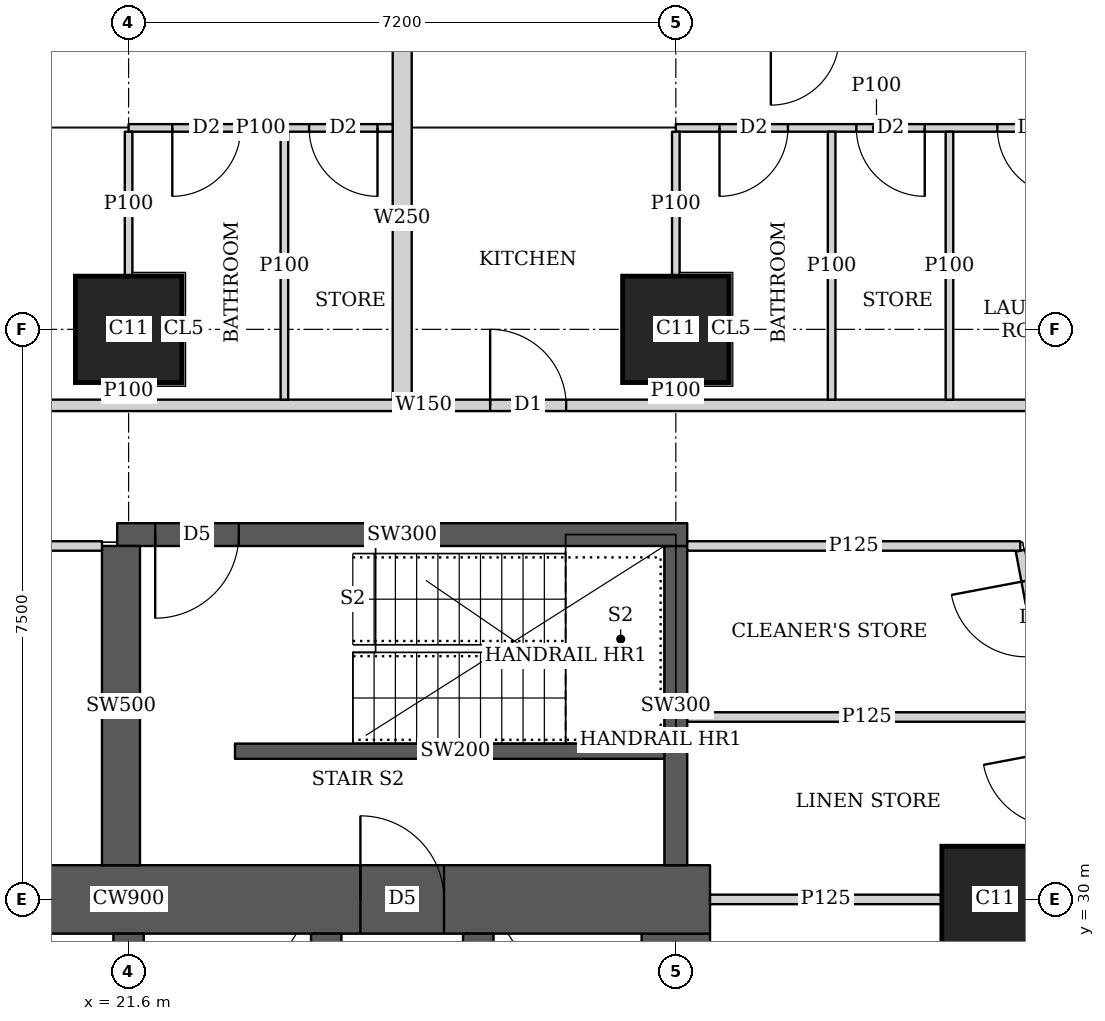
"""IFC4 building model, lengths in metres.
Left out: names, types, materials, properties, quantities, classifications, styles, units other than length and angle.
Written with IfcOpenShell. Run it as: python <this file> out.ifc"""

import sys

from ifc_helpers import new_model, si_unit, direction, frame, frame_2d, origin, origin_2d, place, context, subcontext, project, spatial, rectangle, extrude, element, fill, save


model = new_model("IFC4")
c1 = context("Model", 3, precision=1e-05, world=origin(), true_north=direction((0.0, 1.0)))
c2 = subcontext(c1, "Body", "Model", "MODEL_VIEW")
j1 = project(units=[si_unit("LENGTHUNIT", "METRE"), si_unit("PLANEANGLEUNIT", "RADIAN")], contexts=[c1])
p1 = place(None, origin())
s1 = spatial("IfcSite", under=j1, at=p1, CompositionType="ELEMENT")
p2 = place(p1, origin())
s2 = spatial("IfcBuilding", under=s1, at=p2, CompositionType="ELEMENT")
p3 = place(p2, frame((0.0, 0.0, 223.7)))
s3 = spatial("IfcBuildingStorey", under=s2, at=p3, CompositionType="ELEMENT", Elevation=223.7)
for number, where, z_axis, x_axis in (
    (1, (33.0, 30.0, 0.0), (0.0, 0.0, 1.0), (1.0, 0.0, 0.0)),
    (2, (21.6, 37.5, 0.0), (0.0, 0.0, 1.0), (1.0, 0.0, 0.0)),
    (3, (28.8, 37.5, 0.0), (0.0, 0.0, 1.0), (1.0, 0.0, 0.0)),
):
    element("IfcColumn", number, at=place(p3, frame(where, z_axis=z_axis, x_axis=x_axis)), inside=s3, PredefinedType="COLUMN", context=c2, shape_type="SweptSolid", body=[
        extrude(rectangle(XDim=1.4, YDim=1.4, at=origin_2d()), origin(), (0.0, 0.0, 1.0), 3.75),
    ])
p4 = place(p3, frame((13.95, 30.0, 0.0), z_axis=(0.0, 0.0, 1.0), x_axis=(1.0, 0.0, 0.0)))
e4 = element("IfcWall", 4, at=p4, inside=s3, PredefinedType="SHEAR", context=c2, shape_type="SweptSolid", body=[
    extrude(rectangle(XDim=15.3, YDim=0.9, at=frame_2d((7.65, 0.0))), origin(), (0.0, 0.0, 1.0), 3.75),
])
p5 = place(p4, frame((4.45, 0.0, 0.0)))
e5 = element("IfcOpeningElement", 5, at=p5, cuts=e4, PredefinedType="OPENING", context=c2, shape_type="SweptSolid", body=[
    extrude(rectangle(XDim=1.8, YDim=2.1, at=frame_2d((0.9, 1.05))), frame((0.0, 0.46, 0.0), z_axis=(0.0, -1.0, 0.0), x_axis=(1.0, 0.0, 0.0)), (0.0, 0.0, 1.0), 0.92),
])
p6 = place(p4, frame((10.7, 0.0, 0.0)))
e6 = element("IfcOpeningElement", 6, at=p6, cuts=e4, PredefinedType="OPENING", context=c2, shape_type="SweptSolid", body=[
    extrude(rectangle(XDim=1.1, YDim=2.1, at=frame_2d((0.55, 1.05))), frame((0.0, 0.46, 0.0), z_axis=(0.0, -1.0, 0.0), x_axis=(1.0, 0.0, 0.0)), (0.0, 0.0, 1.0), 0.92),
])
p7 = place(p3, frame((28.8, 15.45, 0.0), z_axis=(0.0, 0.0, 1.0), x_axis=(0.0, 1.0, 0.0)))
e7 = element("IfcWall", 7, at=p7, inside=s3, PredefinedType="SHEAR", context=c2, shape_type="SweptSolid", body=[
    extrude(rectangle(XDim=14.1, YDim=0.9, at=frame_2d((7.05, 0.0))), origin(), (0.0, 0.0, 1.0), 3.75),
])
p8 = place(p3, frame((21.6, 15.45, 0.0), z_axis=(0.0, 0.0, 1.0), x_axis=(0.0, 1.0, 0.0)))
e8 = element("IfcWall", 8, at=p8, inside=s3, PredefinedType="SHEAR", context=c2, shape_type="SweptSolid", body=[
    extrude(rectangle(XDim=14.1, YDim=0.4, at=frame_2d((7.05, 0.0))), origin(), (0.0, 0.0, 1.0), 3.75),
])
p9 = place(p8, frame((0.875, 0.0, 0.0)))
e9 = element("IfcOpeningElement", 9, at=p9, cuts=e8, PredefinedType="OPENING", context=c2, shape_type="SweptSolid", body=[
    extrude(rectangle(XDim=1.1, YDim=2.1, at=frame_2d((0.55, 1.05))), frame((0.0, 0.21, 0.0), z_axis=(0.0, -1.0, 0.0), x_axis=(1.0, 0.0, 0.0)), (0.0, 0.0, 1.0), 0.42),
])
p10 = place(p8, frame((4.625, 0.0, 0.0)))
e10 = element("IfcOpeningElement", 10, at=p10, cuts=e8, PredefinedType="OPENING", context=c2, shape_type="SweptSolid", body=[
    extrude(rectangle(XDim=1.1, YDim=2.1, at=frame_2d((0.55, 1.05))), frame((0.0, 0.21, 0.0), z_axis=(0.0, -1.0, 0.0), x_axis=(1.0, 0.0, 0.0)), (0.0, 0.0, 1.0), 0.42),
])
p11 = place(p8, frame((8.375, 0.0, 0.0)))
e11 = element("IfcOpeningElement", 11, at=p11, cuts=e8, PredefinedType="OPENING", context=c2, shape_type="SweptSolid", body=[
    extrude(rectangle(XDim=1.1, YDim=2.1, at=frame_2d((0.55, 1.05))), frame((0.0, 0.21, 0.0), z_axis=(0.0, -1.0, 0.0), x_axis=(1.0, 0.0, 0.0)), (0.0, 0.0, 1.0), 0.42),
])
p12 = place(p8, frame((12.125, 0.0, 0.0)))
e12 = element("IfcOpeningElement", 12, at=p12, cuts=e8, PredefinedType="OPENING", context=c2, shape_type="SweptSolid", body=[
    extrude(rectangle(XDim=1.1, YDim=2.1, at=frame_2d((0.55, 1.05))), frame((0.0, 0.21, 0.0), z_axis=(0.0, -1.0, 0.0), x_axis=(1.0, 0.0, 0.0)), (0.0, 0.0, 1.0), 0.42),
])
p13 = place(p3, frame((24.2, 15.45, 0.0), z_axis=(0.0, 0.0, 1.0), x_axis=(0.0, 1.0, 0.0)))
e13 = element("IfcWall", 13, at=p13, inside=s3, PredefinedType="SHEAR", context=c2, shape_type="SweptSolid", body=[
    extrude(rectangle(XDim=14.1, YDim=0.4, at=frame_2d((7.05, 0.0))), origin(), (0.0, 0.0, 1.0), 3.75),
])
p14 = place(p3, frame((26.2, 26.45, 0.0), z_axis=(0.0, 0.0, 1.0), x_axis=(0.0, 1.0, 0.0)))
e14 = element("IfcWall", 14, at=p14, inside=s3, PredefinedType="SHEAR", context=c2, shape_type="SweptSolid", body=[
    extrude(rectangle(XDim=3.1, YDim=0.4, at=frame_2d((1.55, 0.0))), origin(), (0.0, 0.0, 1.0), 3.75),
])
p15 = place(p14, frame((1.075, 0.0, 0.0)))
e15 = element("IfcOpeningElement", 15, at=p15, cuts=e14, PredefinedType="OPENING", context=c2, shape_type="SweptSolid", body=[
    extrude(rectangle(XDim=1.2, YDim=2.1, at=frame_2d((0.6, 1.05))), frame((0.0, 0.21, 0.0), z_axis=(0.0, -1.0, 0.0), x_axis=(1.0, 0.0, 0.0)), (0.0, 0.0, 1.0), 0.42),
])
p16 = place(p3, frame((21.45, 34.8, 0.0), z_axis=(0.0, 0.0, 1.0), x_axis=(1.0, 0.0, 0.0)))
e16 = element("IfcWall", 16, at=p16, inside=s3, PredefinedType="SHEAR", context=c2, shape_type="SweptSolid", body=[
    extrude(rectangle(XDim=7.5, YDim=0.3, at=frame_2d((3.75, 0.0))), origin(), (0.0, 0.0, 1.0), 3.75),
])
p17 = place(p16, frame((0.5, 0.0, 0.0)))
e17 = element("IfcOpeningElement", 17, at=p17, cuts=e16, PredefinedType="OPENING", context=c2, shape_type="SweptSolid", body=[
    extrude(rectangle(XDim=1.1, YDim=2.1, at=frame_2d((0.55, 1.05))), frame((0.0, 0.16, 0.0), z_axis=(0.0, -1.0, 0.0), x_axis=(1.0, 0.0, 0.0)), (0.0, 0.0, 1.0), 0.32),
])
p18 = place(p3, frame((21.5, 30.45, 0.0), z_axis=(0.0, 0.0, 1.0), x_axis=(0.0, 1.0, 0.0)))
e18 = element("IfcWall", 18, at=p18, inside=s3, PredefinedType="SHEAR", context=c2, shape_type="SweptSolid", body=[
    extrude(rectangle(XDim=4.2, YDim=0.5, at=frame_2d((2.1, 0.0))), origin(), (0.0, 0.0, 1.0), 3.75),
])
p19 = place(p3, frame((28.8, 30.45, 0.0), z_axis=(0.0, 0.0, 1.0), x_axis=(0.0, 1.0, 0.0)))
e19 = element("IfcWall", 19, at=p19, inside=s3, PredefinedType="SHEAR", context=c2, shape_type="SweptSolid", body=[
    extrude(rectangle(XDim=4.2, YDim=0.3, at=frame_2d((2.1, 0.0))), origin(), (0.0, 0.0, 1.0), 3.75),
])
p20 = place(p3, frame((16.201, 36.5, 0.0), z_axis=(0.0, 0.0, 1.0), x_axis=(1.0, 0.0, 0.0)))
e20 = element("IfcWall", 20, at=p20, inside=s3, PredefinedType="SOLIDWALL", context=c2, shape_type="SweptSolid", body=[
    extrude(rectangle(XDim=18.564, YDim=0.15, at=frame_2d((9.282, 0.0))), origin(), (0.0, 0.0, 1.0), 3.5),
])
p21 = place(p20, frame((0.874, 0.0, 0.0)))
e21 = element("IfcOpeningElement", 21, at=p21, cuts=e20, PredefinedType="OPENING", context=c2, shape_type="SweptSolid", body=[
    extrude(rectangle(XDim=1.0, YDim=2.1, at=frame_2d((0.5, 1.05))), frame((0.0, 0.085, 0.0), z_axis=(0.0, -1.0, 0.0), x_axis=(1.0, 0.0, 0.0)), (0.0, 0.0, 1.0), 0.17),
])
p22 = place(p20, frame((10.156, 0.0, 0.0)))
e22 = element("IfcOpeningElement", 22, at=p22, cuts=e20, PredefinedType="OPENING", context=c2, shape_type="SweptSolid", body=[
    extrude(rectangle(XDim=1.0, YDim=2.1, at=frame_2d((0.5, 1.05))), frame((0.0, 0.085, 0.0), z_axis=(0.0, -1.0, 0.0), x_axis=(1.0, 0.0, 0.0)), (0.0, 0.0, 1.0), 0.17),
])
p23 = place(p3, frame((21.6, 40.15, 0.0), z_axis=(0.0, 0.0, 1.0), x_axis=(1.0, 0.0, 0.0)))
e23 = element("IfcWall", 23, at=p23, inside=s3, PredefinedType="PARTITIONING", context=c2, shape_type="SweptSolid", body=[
    extrude(rectangle(XDim=3.475, YDim=0.1, at=frame_2d((1.737, 0.0))), origin(), (0.0, 0.0, 1.0), 3.5),
])
p24 = place(p23, frame((0.575, 0.0, 0.0)))
e24 = element("IfcOpeningElement", 24, at=p24, cuts=e23, PredefinedType="OPENING", context=c2, shape_type="SweptSolid", body=[
    extrude(rectangle(XDim=0.9, YDim=2.1, at=frame_2d((0.45, 1.05))), frame((0.0, 0.06, 0.0), z_axis=(0.0, -1.0, 0.0), x_axis=(1.0, 0.0, 0.0)), (0.0, 0.0, 1.0), 0.12),
])
p25 = place(p23, frame((2.375, 0.0, 0.0)))
e25 = element("IfcOpeningElement", 25, at=p25, cuts=e23, PredefinedType="OPENING", context=c2, shape_type="SweptSolid", body=[
    extrude(rectangle(XDim=0.9, YDim=2.1, at=frame_2d((0.45, 1.05))), frame((0.0, 0.06, 0.0), z_axis=(0.0, -1.0, 0.0), x_axis=(1.0, 0.0, 0.0)), (0.0, 0.0, 1.0), 0.12),
])
p26 = place(p3, frame((21.6, 36.575, 0.0), z_axis=(0.0, 0.0, 1.0), x_axis=(0.0, 1.0, 0.0)))
e26 = element("IfcWall", 26, at=p26, inside=s3, PredefinedType="PARTITIONING", context=c2, shape_type="SweptSolid", body=[
    extrude(rectangle(XDim=0.224, YDim=0.1, at=frame_2d((0.112, 0.0))), origin(), (0.0, 0.0, 1.0), 3.5),
])
p27 = place(p3, frame((21.6, 38.201, 0.0), z_axis=(0.0, 0.0, 1.0), x_axis=(0.0, 1.0, 0.0)))
e27 = element("IfcWall", 27, at=p27, inside=s3, PredefinedType="PARTITIONING", context=c2, shape_type="SweptSolid", body=[
    extrude(rectangle(XDim=1.899, YDim=0.1, at=frame_2d((0.95, 0.0))), origin(), (0.0, 0.0, 1.0), 3.5),
])
p28 = place(p3, frame((23.65, 36.575, 0.0), z_axis=(0.0, 0.0, 1.0), x_axis=(0.0, 1.0, 0.0)))
e28 = element("IfcWall", 28, at=p28, inside=s3, PredefinedType="PARTITIONING", context=c2, shape_type="SweptSolid", body=[
    extrude(rectangle(XDim=3.525, YDim=0.1, at=frame_2d((1.763, 0.0))), origin(), (0.0, 0.0, 1.0), 3.5),
])
p29 = place(p3, frame((28.8, 40.15, 0.0), z_axis=(0.0, 0.0, 1.0), x_axis=(1.0, 0.0, 0.0)))
e29 = element("IfcWall", 29, at=p29, inside=s3, PredefinedType="PARTITIONING", context=c2, shape_type="SweptSolid", body=[
    extrude(rectangle(XDim=5.28, YDim=0.1, at=frame_2d((2.64, 0.0))), origin(), (0.0, 0.0, 1.0), 3.5),
])
p30 = place(p29, frame((0.575, 0.0, 0.0)))
e30 = element("IfcOpeningElement", 30, at=p30, cuts=e29, PredefinedType="OPENING", context=c2, shape_type="SweptSolid", body=[
    extrude(rectangle(XDim=0.9, YDim=2.1, at=frame_2d((0.45, 1.05))), frame((0.0, 0.06, 0.0), z_axis=(0.0, -1.0, 0.0), x_axis=(1.0, 0.0, 0.0)), (0.0, 0.0, 1.0), 0.12),
])
p31 = place(p29, frame((4.23, 0.0, 0.0)))
e31 = element("IfcOpeningElement", 31, at=p31, cuts=e29, PredefinedType="OPENING", context=c2, shape_type="SweptSolid", body=[
    extrude(rectangle(XDim=0.9, YDim=2.1, at=frame_2d((0.45, 1.05))), frame((0.0, 0.06, 0.0), z_axis=(0.0, -1.0, 0.0), x_axis=(1.0, 0.0, 0.0)), (0.0, 0.0, 1.0), 0.12),
])
p32 = place(p29, frame((2.375, 0.0, 0.0)))
e32 = element("IfcOpeningElement", 32, at=p32, cuts=e29, PredefinedType="OPENING", context=c2, shape_type="SweptSolid", body=[
    extrude(rectangle(XDim=0.9, YDim=2.1, at=frame_2d((0.45, 1.05))), frame((0.0, 0.06, 0.0), z_axis=(0.0, -1.0, 0.0), x_axis=(1.0, 0.0, 0.0)), (0.0, 0.0, 1.0), 0.12),
])
p33 = place(p3, frame((28.8, 36.575, 0.0), z_axis=(0.0, 0.0, 1.0), x_axis=(0.0, 1.0, 0.0)))
e33 = element("IfcWall", 33, at=p33, inside=s3, PredefinedType="PARTITIONING", context=c2, shape_type="SweptSolid", body=[
    extrude(rectangle(XDim=0.224, YDim=0.1, at=frame_2d((0.112, 0.0))), origin(), (0.0, 0.0, 1.0), 3.5),
])
p34 = place(p3, frame((28.8, 38.201, 0.0), z_axis=(0.0, 0.0, 1.0), x_axis=(0.0, 1.0, 0.0)))
e34 = element("IfcWall", 34, at=p34, inside=s3, PredefinedType="PARTITIONING", context=c2, shape_type="SweptSolid", body=[
    extrude(rectangle(XDim=1.899, YDim=0.1, at=frame_2d((0.95, 0.0))), origin(), (0.0, 0.0, 1.0), 3.5),
])
for number, where, z_axis, x_axis in (
    (35, (32.4, 36.575, 0.0), (0.0, 0.0, 1.0), (0.0, 1.0, 0.0)),
    (36, (30.85, 36.575, 0.0), (0.0, 0.0, 1.0), (0.0, 1.0, 0.0)),
):
    element("IfcWall", number, at=place(p3, frame(where, z_axis=z_axis, x_axis=x_axis)), inside=s3, PredefinedType="PARTITIONING", context=c2, shape_type="SweptSolid", body=[
        extrude(rectangle(XDim=3.525, YDim=0.1, at=frame_2d((1.763, 0.0))), origin(), (0.0, 0.0, 1.0), 3.5),
    ])
p35 = place(p3, frame((25.2, 36.575, 0.0), z_axis=(0.0, 0.0, 1.0), x_axis=(0.0, 1.0, 0.0)))
e37 = element("IfcWall", 37, at=p35, inside=s3, PredefinedType="SOLIDWALL", context=c2, shape_type="SweptSolid", body=[
    extrude(rectangle(XDim=4.775, YDim=0.25, at=frame_2d((2.388, 0.0))), origin(), (0.0, 0.0, 1.0), 3.5),
])
p36 = place(p3, frame((13.75, 34.65, 0.0), z_axis=(0.0, 0.0, 1.0), x_axis=(1.0, 0.0, 0.0)))
e38 = element("IfcWall", 38, at=p36, inside=s3, PredefinedType="PARTITIONING", context=c2, shape_type="SweptSolid", body=[
    extrude(rectangle(XDim=7.5, YDim=0.125, at=frame_2d((3.75, 0.0))), origin(), (0.0, 0.0, 1.0), 3.5),
])
p37 = place(p36, frame((4.15, 0.0, 0.0)))
e39 = element("IfcOpeningElement", 39, at=p37, cuts=e38, PredefinedType="OPENING", context=c2, shape_type="SweptSolid", body=[
    extrude(rectangle(XDim=1.8, YDim=2.1, at=frame_2d((0.9, 1.05))), frame((0.0, 0.073, 0.0), z_axis=(0.0, -1.0, 0.0), x_axis=(1.0, 0.0, 0.0)), (0.0, 0.0, 1.0), 0.145),
])
p38 = place(p3, frame((28.95, 34.65, 0.0), z_axis=(0.0, 0.0, 1.0), x_axis=(1.0, 0.0, 0.0)))
e40 = element("IfcWall", 40, at=p38, inside=s3, PredefinedType="PARTITIONING", context=c2, shape_type="SweptSolid", body=[
    extrude(rectangle(XDim=4.381, YDim=0.125, at=frame_2d((2.19, 0.0))), origin(), (0.0, 0.0, 1.0), 3.5),
])
p39 = place(p3, frame((34.193, 30.04, 0.0), z_axis=(0.0, 0.0, 1.0), x_axis=(-0.185626015863, 0.982620467034, 0.0)))
e41 = element("IfcWall", 41, at=p39, inside=s3, PredefinedType="PARTITIONING", context=c2, shape_type="SweptSolid", body=[
    extrude(rectangle(XDim=4.628, YDim=0.125, at=frame_2d((2.314, 0.0))), origin(), (0.0, 0.0, 1.0), 2.5),
])
p40 = place(p39, frame((0.95, 0.0, 0.0)))
e42 = element("IfcOpeningElement", 42, at=p40, cuts=e41, PredefinedType="OPENING", context=c2, shape_type="SweptSolid", body=[
    extrude(rectangle(XDim=1.0, YDim=2.1, at=frame_2d((0.5, 1.05))), frame((0.0, 0.073, 0.0), z_axis=(0.0, -1.0, 0.0), x_axis=(1.0, 0.0, 0.0)), (0.0, 0.0, 1.0), 0.145),
])
p41 = place(p39, frame((3.225, 0.0, 0.0)))
e43 = element("IfcOpeningElement", 43, at=p41, cuts=e41, PredefinedType="OPENING", context=c2, shape_type="SweptSolid", body=[
    extrude(rectangle(XDim=1.0, YDim=2.1, at=frame_2d((0.5, 1.05))), frame((0.0, 0.073, 0.0), z_axis=(0.0, -1.0, 0.0), x_axis=(1.0, 0.0, 0.0)), (0.0, 0.0, 1.0), 0.145),
])
p42 = place(p3, frame((29.25, 30.0, 0.0), z_axis=(0.0, 0.0, 1.0), x_axis=(1.0, 0.0, 0.0)))
e44 = element("IfcWall", 44, at=p42, inside=s3, PredefinedType="PARTITIONING", context=c2, shape_type="SweptSolid", body=[
    extrude(rectangle(XDim=3.049, YDim=0.125, at=frame_2d((1.524, 0.0))), origin(), (0.0, 0.0, 1.0), 3.5),
])
p43 = place(p3, frame((28.95, 32.4, 0.0), z_axis=(0.0, 0.0, 1.0), x_axis=(1.0, 0.0, 0.0)))
e45 = element("IfcWall", 45, at=p43, inside=s3, PredefinedType="PARTITIONING", context=c2, shape_type="SweptSolid", body=[
    extrude(rectangle(XDim=4.722, YDim=0.125, at=frame_2d((2.361, 0.0))), origin(), (0.0, 0.0, 1.0), 3.5),
])
p44 = place(p3, frame((23.0, 31.95, 0.0), z_axis=(0.0, 0.0, 1.0), x_axis=(1.0, 0.0, 0.0)))
e46 = element("IfcWall", 46, at=p44, inside=s3, PredefinedType="SHEAR", context=c2, shape_type="SweptSolid", body=[
    extrude(rectangle(XDim=5.8, YDim=0.2, at=frame_2d((2.9, 0.0))), origin(), (0.0, 0.0, 1.0), 3.75),
])
p45 = place(p24, origin())
e47 = element("IfcDoor", 47, at=p45, inside=s3, OperationType="SINGLE_SWING_RIGHT", PredefinedType="DOOR", context=c2, shape_type="SweptSolid", body=[
    extrude(rectangle(XDim=0.9, YDim=2.1, at=frame_2d((0.45, 1.05))), frame((0.0, 0.025, 0.0), z_axis=(0.0, -1.0, 0.0), x_axis=(1.0, 0.0, 0.0)), (0.0, 0.0, 1.0), 0.05),
])
fill(e24, e47)
p46 = place(p25, origin())
e48 = element("IfcDoor", 48, at=p46, inside=s3, OperationType="SINGLE_SWING_LEFT", PredefinedType="DOOR", context=c2, shape_type="SweptSolid", body=[
    extrude(rectangle(XDim=0.9, YDim=2.1, at=frame_2d((0.45, 1.05))), frame((0.0, 0.025, 0.0), z_axis=(0.0, -1.0, 0.0), x_axis=(1.0, 0.0, 0.0)), (0.0, 0.0, 1.0), 0.05),
])
fill(e25, e48)
p47 = place(p30, origin())
e49 = element("IfcDoor", 49, at=p47, inside=s3, OperationType="SINGLE_SWING_RIGHT", PredefinedType="DOOR", context=c2, shape_type="SweptSolid", body=[
    extrude(rectangle(XDim=0.9, YDim=2.1, at=frame_2d((0.45, 1.05))), frame((0.0, 0.025, 0.0), z_axis=(0.0, -1.0, 0.0), x_axis=(1.0, 0.0, 0.0)), (0.0, 0.0, 1.0), 0.05),
])
fill(e30, e49)
p48 = place(p31, origin())
e50 = element("IfcDoor", 50, at=p48, inside=s3, OperationType="SINGLE_SWING_LEFT", PredefinedType="DOOR", context=c2, shape_type="SweptSolid", body=[
    extrude(rectangle(XDim=0.9, YDim=2.1, at=frame_2d((0.45, 1.05))), frame((0.0, 0.025, 0.0), z_axis=(0.0, -1.0, 0.0), x_axis=(1.0, 0.0, 0.0)), (0.0, 0.0, 1.0), 0.05),
])
fill(e31, e50)
p49 = place(p32, origin())
e51 = element("IfcDoor", 51, at=p49, inside=s3, OperationType="SINGLE_SWING_LEFT", PredefinedType="DOOR", context=c2, shape_type="SweptSolid", body=[
    extrude(rectangle(XDim=0.9, YDim=2.1, at=frame_2d((0.45, 1.05))), frame((0.0, 0.025, 0.0), z_axis=(0.0, -1.0, 0.0), x_axis=(1.0, 0.0, 0.0)), (0.0, 0.0, 1.0), 0.05),
])
fill(e32, e51)
p50 = place(p22, origin())
e52 = element("IfcDoor", 52, at=p50, inside=s3, OperationType="SINGLE_SWING_LEFT", PredefinedType="DOOR", context=c2, shape_type="SweptSolid", body=[
    extrude(rectangle(XDim=1.0, YDim=2.1, at=frame_2d((0.5, 1.05))), frame((0.0, 0.025, 0.0), z_axis=(0.0, -1.0, 0.0), x_axis=(1.0, 0.0, 0.0)), (0.0, 0.0, 1.0), 0.05),
])
fill(e22, e52)
p51 = place(p41, origin())
e53 = element("IfcDoor", 53, at=p51, inside=s3, OperationType="SINGLE_SWING_RIGHT", PredefinedType="DOOR", context=c2, shape_type="SweptSolid", body=[
    extrude(rectangle(XDim=1.0, YDim=2.1, at=frame_2d((0.5, 1.05))), frame((0.0, 0.025, 0.0), z_axis=(0.0, -1.0, 0.0), x_axis=(1.0, 0.0, 0.0)), (0.0, 0.0, 1.0), 0.05),
])
fill(e43, e53)
p52 = place(p6, origin())
e54 = element("IfcDoor", 54, at=p52, inside=s3, OperationType="SINGLE_SWING_LEFT", PredefinedType="DOOR", context=c2, shape_type="SweptSolid", body=[
    extrude(rectangle(XDim=1.1, YDim=2.1, at=frame_2d((0.55, 1.05))), frame((0.0, 0.025, 0.0), z_axis=(0.0, -1.0, 0.0), x_axis=(1.0, 0.0, 0.0)), (0.0, 0.0, 1.0), 0.05),
])
fill(e6, e54)
p53 = place(p17, origin())
e55 = element("IfcDoor", 55, at=p53, inside=s3, OperationType="SINGLE_SWING_RIGHT", PredefinedType="DOOR", context=c2, shape_type="SweptSolid", body=[
    extrude(rectangle(XDim=1.1, YDim=2.1, at=frame_2d((0.55, 1.05))), frame((0.0, 0.025, 0.0), z_axis=(0.0, -1.0, 0.0), x_axis=(1.0, 0.0, 0.0)), (0.0, 0.0, 1.0), 0.05),
])
fill(e17, e55)
save(model, sys.argv[1])
